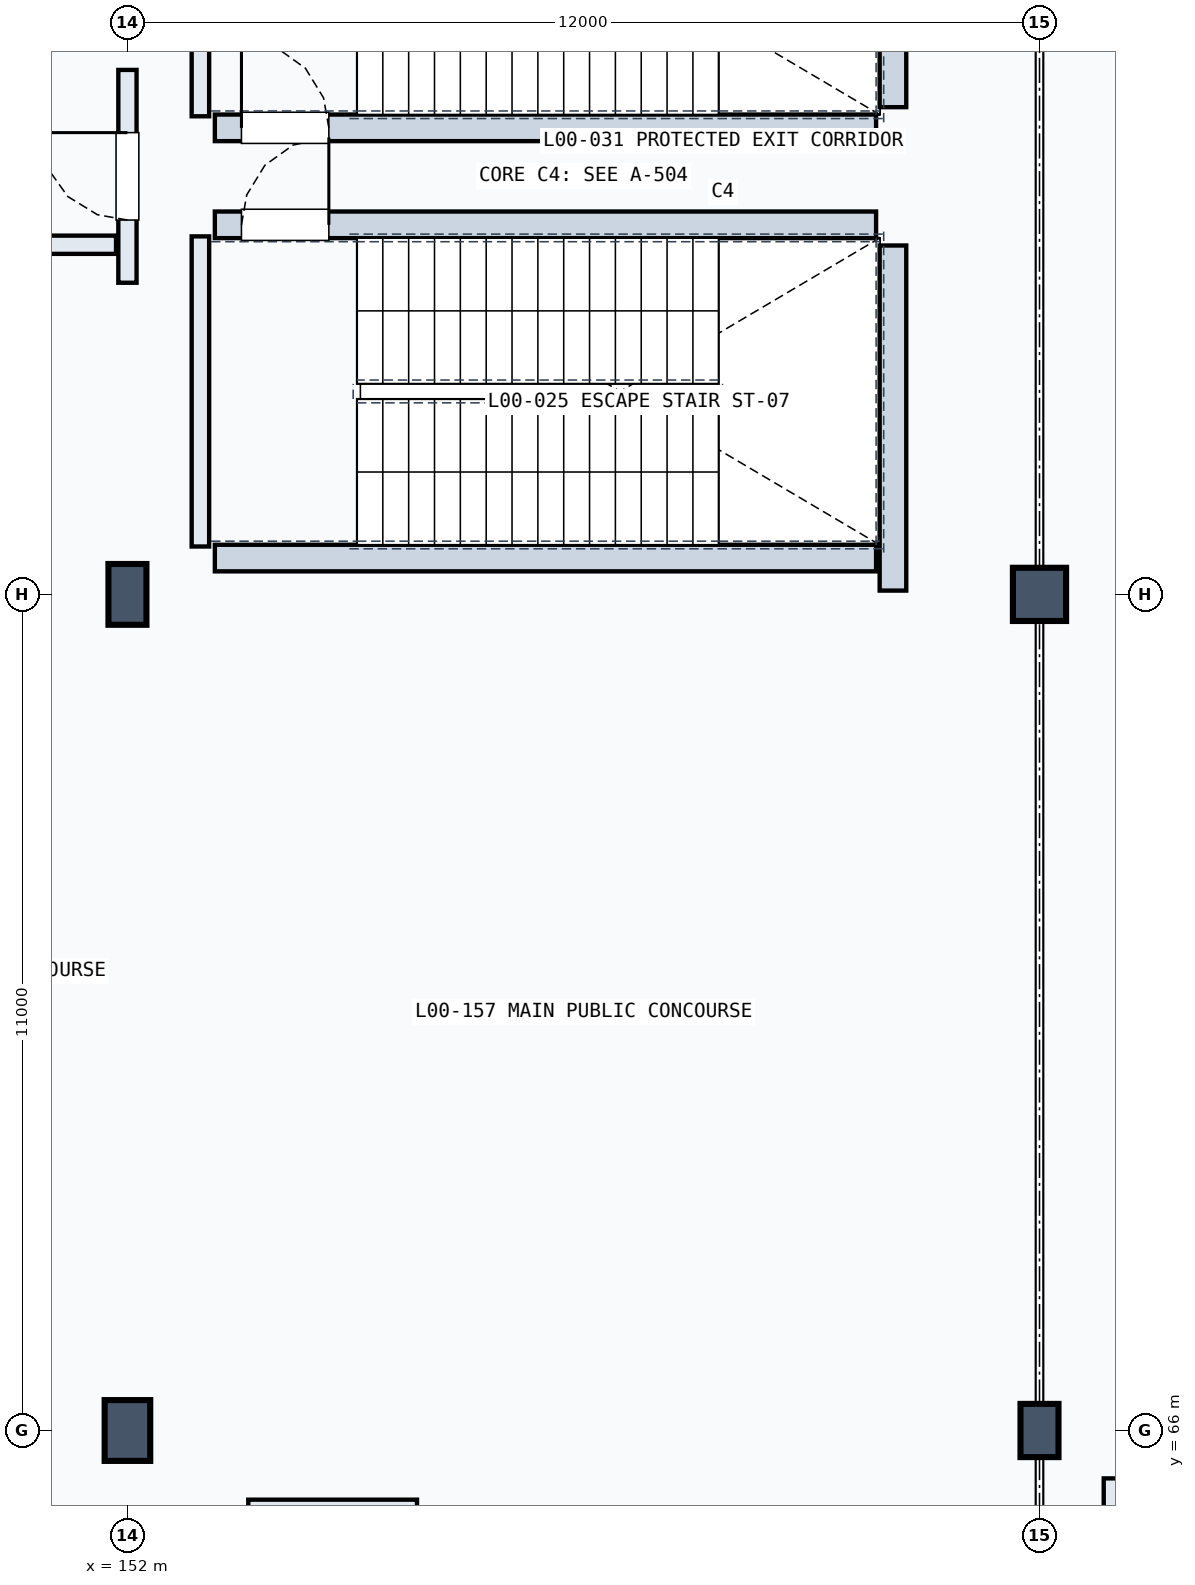
"""IFC4 building model, lengths in metres.
Left out: names, types, materials, properties, quantities, classifications, styles, units other than length and angle.
Written with IfcOpenShell. Run it as: python <this file> out.ifc"""

import sys

from ifc_helpers import new_model, si_unit, direction, frame, frame_2d, origin, origin_2d, place, context, subcontext, project, spatial, rectangle, extrude, element, fill, save


model = new_model("IFC4")
c1 = context("Model", 3, precision=1e-05, world=origin(), true_north=direction((0.0, 1.0)))
c2 = subcontext(c1, "Body", "Model", "MODEL_VIEW")
j1 = project(units=[si_unit("LENGTHUNIT", "METRE"), si_unit("PLANEANGLEUNIT", "RADIAN")], contexts=[c1])
p1 = place(None, origin())
s1 = spatial("IfcSite", under=j1, at=p1, CompositionType="ELEMENT")
p2 = place(p1, origin())
s2 = spatial("IfcBuilding", under=s1, at=p2, CompositionType="ELEMENT")
p3 = place(p2, origin())
s3 = spatial("IfcBuildingStorey", under=s2, at=p3, CompositionType="ELEMENT", Elevation=0.0)
p4 = place(p3, frame((152.0, 66.0, 0.0), z_axis=(0.0, 0.0, 1.0), x_axis=(1.0, 0.0, 0.0)))
e1 = element("IfcColumn", 1, at=p4, inside=s3, PredefinedType="COLUMN", context=c2, shape_type="SweptSolid", body=[
    extrude(rectangle(XDim=0.6, YDim=0.8, at=origin_2d()), origin(), (0.0, 0.0, 1.0), 5.4),
])
p5 = place(p3, frame((152.0, 77.0, 0.0), z_axis=(0.0, 0.0, 1.0), x_axis=(1.0, 0.0, 0.0)))
e2 = element("IfcColumn", 2, at=p5, inside=s3, PredefinedType="COLUMN", context=c2, shape_type="SweptSolid", body=[
    extrude(rectangle(XDim=0.5, YDim=0.8, at=origin_2d()), origin(), (0.0, 0.0, 1.0), 5.4),
])
p6 = place(p3, frame((164.0, 66.0, 0.0), z_axis=(0.0, 0.0, 1.0), x_axis=(1.0, 0.0, 0.0)))
e3 = element("IfcColumn", 3, at=p6, inside=s3, PredefinedType="COLUMN", context=c2, shape_type="SweptSolid", body=[
    extrude(rectangle(XDim=0.5, YDim=0.7, at=origin_2d()), origin(), (0.0, 0.0, 1.0), 5.4),
])
p7 = place(p3, frame((164.0, 77.0, 0.0), z_axis=(0.0, 0.0, 1.0), x_axis=(1.0, 0.0, 0.0)))
e4 = element("IfcColumn", 4, at=p7, inside=s3, PredefinedType="COLUMN", context=c2, shape_type="SweptSolid", body=[
    extrude(rectangle(XDim=0.7, YDim=0.7, at=origin_2d()), origin(), (0.0, 0.0, 1.0), 5.4),
])
p8 = place(p3, frame((152.96, 77.63, 0.0), z_axis=(0.0, 0.0, 1.0), x_axis=(0.0, 1.0, 0.0)))
e5 = element("IfcWall", 5, at=p8, inside=s3, PredefinedType="SOLIDWALL", context=c2, shape_type="SweptSolid", body=[
    extrude(rectangle(XDim=4.08, YDim=0.23, at=frame_2d((2.04, 0.0))), origin(), (0.0, 0.0, 1.0), 5.06),
])
p9 = place(p3, frame((162.072, 77.05, 0.0), z_axis=(0.0, 0.0, 1.0), x_axis=(0.0, 1.0, 0.0)))
e6 = element("IfcWall", 6, at=p9, inside=s3, PredefinedType="SOLIDWALL", context=c2, shape_type="SweptSolid", body=[
    extrude(rectangle(XDim=4.54, YDim=0.35, at=frame_2d((2.27, 0.0))), origin(), (0.0, 0.0, 1.0), 5.06),
])
p10 = place(p3, frame((153.15, 77.478, 0.0), z_axis=(0.0, 0.0, 1.0), x_axis=(1.0, 0.0, 0.0)))
e7 = element("IfcWall", 7, at=p10, inside=s3, PredefinedType="SOLIDWALL", context=c2, shape_type="SweptSolid", body=[
    extrude(rectangle(XDim=8.7, YDim=0.35, at=frame_2d((4.35, 0.0))), origin(), (0.0, 0.0, 1.0), 5.06),
])
p11 = place(p3, frame((153.15, 81.862, 0.0), z_axis=(0.0, 0.0, 1.0), x_axis=(1.0, 0.0, 0.0)))
e8 = element("IfcWall", 8, at=p11, inside=s3, PredefinedType="SOLIDWALL", context=c2, shape_type="SweptSolid", body=[
    extrude(rectangle(XDim=8.7, YDim=0.35, at=frame_2d((4.35, 0.0))), origin(), (0.0, 0.0, 1.0), 5.06),
])
p12 = place(p11, frame((0.35, 0.0, 0.0)))
e9 = element("IfcOpeningElement", 9, at=p12, cuts=e8, PredefinedType="OPENING", context=c2, shape_type="SweptSolid", body=[
    extrude(rectangle(XDim=1.15, YDim=2.2, at=frame_2d((0.575, 1.1))), frame((0.0, 0.185, 0.0), z_axis=(0.0, -1.0, 0.0), x_axis=(1.0, 0.0, 0.0)), (0.0, 0.0, 1.0), 0.37),
])
p13 = place(p3, frame((152.96, 83.29, 0.0), z_axis=(0.0, 0.0, 1.0), x_axis=(0.0, 1.0, 0.0)))
e10 = element("IfcWall", 10, at=p13, inside=s3, PredefinedType="SOLIDWALL", context=c2, shape_type="SweptSolid", body=[
    extrude(rectangle(XDim=4.08, YDim=0.23, at=frame_2d((2.04, 0.0))), origin(), (0.0, 0.0, 1.0), 5.06),
])
p14 = place(p3, frame((162.072, 83.41, 0.0), z_axis=(0.0, 0.0, 1.0), x_axis=(0.0, 1.0, 0.0)))
e11 = element("IfcWall", 11, at=p14, inside=s3, PredefinedType="SOLIDWALL", context=c2, shape_type="SweptSolid", body=[
    extrude(rectangle(XDim=3.84, YDim=0.35, at=frame_2d((1.92, 0.0))), origin(), (0.0, 0.0, 1.0), 5.06),
])
p15 = place(p3, frame((153.15, 83.138, 0.0), z_axis=(0.0, 0.0, 1.0), x_axis=(1.0, 0.0, 0.0)))
e12 = element("IfcWall", 12, at=p15, inside=s3, PredefinedType="SOLIDWALL", context=c2, shape_type="SweptSolid", body=[
    extrude(rectangle(XDim=8.7, YDim=0.35, at=frame_2d((4.35, 0.0))), origin(), (0.0, 0.0, 1.0), 5.06),
])
p16 = place(p15, frame((0.35, 0.0, 0.0)))
e13 = element("IfcOpeningElement", 13, at=p16, cuts=e12, PredefinedType="OPENING", context=c2, shape_type="SweptSolid", body=[
    extrude(rectangle(XDim=1.15, YDim=2.2, at=frame_2d((0.575, 1.1))), frame((0.0, 0.185, 0.0), z_axis=(0.0, -1.0, 0.0), x_axis=(1.0, 0.0, 0.0)), (0.0, 0.0, 1.0), 0.37),
])
p17 = place(p3, frame((153.59, 64.96, 0.0), z_axis=(0.0, 0.0, 1.0), x_axis=(1.0, 0.0, 0.0)))
e14 = element("IfcWall", 14, at=p17, inside=s3, PredefinedType="SOLIDWALL", context=c2, shape_type="SweptSolid", body=[
    extrude(rectangle(XDim=2.22, YDim=0.26, at=frame_2d((1.11, 0.0))), origin(), (0.0, 0.0, 1.0), 5.06),
])
p18 = place(p3, frame((164.96, 61.29, 0.0), z_axis=(0.0, 0.0, 1.0), x_axis=(0.0, 1.0, 0.0)))
e15 = element("IfcWall", 15, at=p18, inside=s3, PredefinedType="SOLIDWALL", context=c2, shape_type="SweptSolid", body=[
    extrude(rectangle(XDim=4.08, YDim=0.23, at=frame_2d((2.04, 0.0))), origin(), (0.0, 0.0, 1.0), 4.45),
])
p19 = place(p3, frame((147.2, 81.6, 0.0), z_axis=(0.0, 0.0, 1.0), x_axis=(1.0, 0.0, 0.0)))
e16 = element("IfcWall", 16, at=p19, inside=s3, PredefinedType="PARTITIONING", context=c2, shape_type="SweptSolid", body=[
    extrude(rectangle(XDim=4.65, YDim=0.24, at=frame_2d((2.325, 0.0))), origin(), (0.0, 0.0, 1.0), 4.65),
])
p20 = place(p3, frame((152.0, 81.1, 0.0), z_axis=(0.0, 0.0, 1.0), x_axis=(0.0, 1.0, 0.0)))
e17 = element("IfcWall", 17, at=p20, inside=s3, PredefinedType="PARTITIONING", context=c2, shape_type="SweptSolid", body=[
    extrude(rectangle(XDim=2.8, YDim=0.24, at=frame_2d((1.4, 0.0))), origin(), (0.0, 0.0, 1.0), 4.65),
])
p21 = place(p20, frame((0.825, 0.0, 0.0)))
e18 = element("IfcOpeningElement", 18, at=p21, cuts=e17, PredefinedType="OPENING", context=c2, shape_type="SweptSolid", body=[
    extrude(rectangle(XDim=1.15, YDim=2.2, at=frame_2d((0.575, 1.1))), frame((0.0, 0.13, 0.0), z_axis=(0.0, -1.0, 0.0), x_axis=(1.0, 0.0, 0.0)), (0.0, 0.0, 1.0), 0.26),
])
p22 = place(p12, origin())
e19 = element("IfcDoor", 19, at=p22, inside=s3, OperationType="SINGLE_SWING_RIGHT", PredefinedType="DOOR", context=c2, shape_type="SweptSolid", body=[
    extrude(rectangle(XDim=1.15, YDim=2.2, at=frame_2d((0.575, 1.1))), frame((0.0, 0.025, 0.0), z_axis=(0.0, -1.0, 0.0), x_axis=(1.0, 0.0, 0.0)), (0.0, 0.0, 1.0), 0.05),
])
fill(e9, e19)
p23 = place(p16, origin())
e20 = element("IfcDoor", 20, at=p23, inside=s3, OperationType="SINGLE_SWING_LEFT", PredefinedType="DOOR", context=c2, shape_type="SweptSolid", body=[
    extrude(rectangle(XDim=1.15, YDim=2.2, at=frame_2d((0.575, 1.1))), frame((0.0, 0.025, 0.0), z_axis=(0.0, -1.0, 0.0), x_axis=(1.0, 0.0, 0.0)), (0.0, 0.0, 1.0), 0.05),
])
fill(e13, e20)
p24 = place(p21, origin())
e21 = element("IfcDoor", 21, at=p24, inside=s3, OperationType="SINGLE_SWING_RIGHT", PredefinedType="DOOR", context=c2, shape_type="SweptSolid", body=[
    extrude(rectangle(XDim=1.15, YDim=2.2, at=frame_2d((0.575, 1.1))), frame((0.0, 0.025, 0.0), z_axis=(0.0, -1.0, 0.0), x_axis=(1.0, 0.0, 0.0)), (0.0, 0.0, 1.0), 0.05),
])
fill(e18, e21)
save(model, sys.argv[1])
